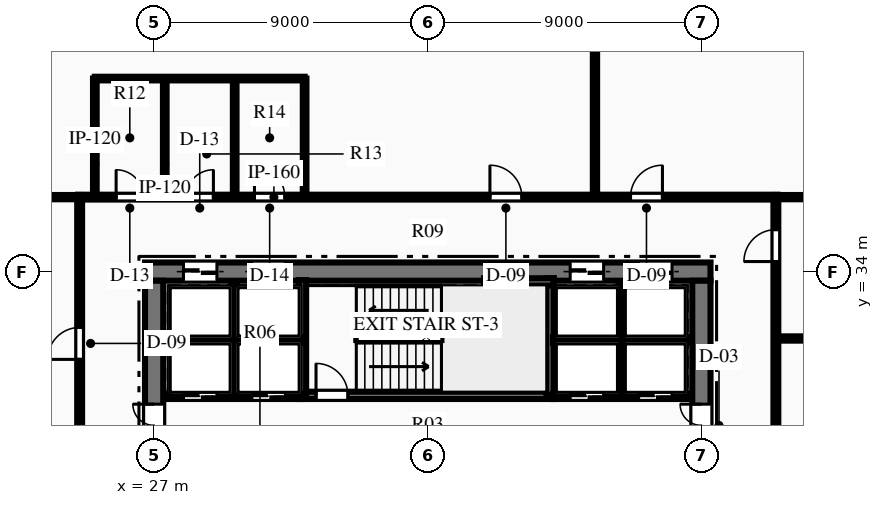
"""IFC4 building model, lengths in metres.
Left out: names, types, materials, properties, quantities, classifications, styles, units other than length and angle.
Written with IfcOpenShell. Run it as: python <this file> out.ifc"""

import sys

from ifc_helpers import new_model, si_unit, direction, frame, frame_2d, origin, place, context, subcontext, project, spatial, rectangle, extrude, element, fill, save


model = new_model("IFC4")
c1 = context("Model", 3, precision=1e-05, world=origin(), true_north=direction((0.0, 1.0)))
c2 = subcontext(c1, "Body", "Model", "MODEL_VIEW")
j1 = project(units=[si_unit("LENGTHUNIT", "METRE"), si_unit("PLANEANGLEUNIT", "RADIAN")], contexts=[c1])
p1 = place(None, origin())
s1 = spatial("IfcSite", under=j1, at=p1, CompositionType="ELEMENT")
p2 = place(p1, origin())
s2 = spatial("IfcBuilding", under=s1, at=p2, CompositionType="ELEMENT")
p3 = place(p2, frame((0.0, 0.0, 47.7)))
s3 = spatial("IfcBuildingStorey", under=s2, at=p3, CompositionType="ELEMENT", Elevation=47.7)
p4 = place(p3, frame((26.7, 34.0, 0.0), z_axis=(0.0, 0.0, 1.0), x_axis=(1.0, 0.0, 0.0)))
e1 = element("IfcWall", 1, at=p4, inside=s3, PredefinedType="SHEAR", context=c2, shape_type="SweptSolid", body=[
    extrude(rectangle(XDim=18.6, YDim=0.6, at=frame_2d((9.3, 0.0))), origin(), (0.0, 0.0, 1.0), 3.75),
])
p5 = place(p4, frame((1.265, 0.0, 0.0)))
e2 = element("IfcOpeningElement", 2, at=p5, cuts=e1, PredefinedType="OPENING", context=c2, shape_type="SweptSolid", body=[
    extrude(rectangle(XDim=1.1, YDim=2.15, at=frame_2d((0.55, 1.075))), frame((0.0, 0.31, 0.0), z_axis=(0.0, -1.0, 0.0), x_axis=(1.0, 0.0, 0.0)), (0.0, 0.0, 1.0), 0.62),
])
p6 = place(p4, frame((3.515, 0.0, 0.0)))
e3 = element("IfcOpeningElement", 3, at=p6, cuts=e1, PredefinedType="OPENING", context=c2, shape_type="SweptSolid", body=[
    extrude(rectangle(XDim=1.1, YDim=2.15, at=frame_2d((0.55, 1.075))), frame((0.0, 0.31, 0.0), z_axis=(0.0, -1.0, 0.0), x_axis=(1.0, 0.0, 0.0)), (0.0, 0.0, 1.0), 0.62),
])
p7 = place(p4, frame((13.985, 0.0, 0.0)))
e4 = element("IfcOpeningElement", 4, at=p7, cuts=e1, PredefinedType="OPENING", context=c2, shape_type="SweptSolid", body=[
    extrude(rectangle(XDim=1.1, YDim=2.15, at=frame_2d((0.55, 1.075))), frame((0.0, 0.31, 0.0), z_axis=(0.0, -1.0, 0.0), x_axis=(1.0, 0.0, 0.0)), (0.0, 0.0, 1.0), 0.62),
])
p8 = place(p4, frame((16.235, 0.0, 0.0)))
e5 = element("IfcOpeningElement", 5, at=p8, cuts=e1, PredefinedType="OPENING", context=c2, shape_type="SweptSolid", body=[
    extrude(rectangle(XDim=1.1, YDim=2.15, at=frame_2d((0.55, 1.075))), frame((0.0, 0.31, 0.0), z_axis=(0.0, -1.0, 0.0), x_axis=(1.0, 0.0, 0.0)), (0.0, 0.0, 1.0), 0.62),
])
p9 = place(p3, frame((27.0, 18.3, 0.0), z_axis=(0.0, 0.0, 1.0), x_axis=(0.0, 1.0, 0.0)))
e6 = element("IfcWall", 6, at=p9, inside=s3, PredefinedType="SHEAR", context=c2, shape_type="SweptSolid", body=[
    extrude(rectangle(XDim=15.4, YDim=0.6, at=frame_2d((7.7, 0.0))), origin(), (0.0, 0.0, 1.0), 3.75),
])
p10 = place(p9, frame((9.94, 0.0, 0.0)))
e7 = element("IfcOpeningElement", 7, at=p10, cuts=e6, PredefinedType="OPENING", context=c2, shape_type="SweptSolid", body=[
    extrude(rectangle(XDim=1.4, YDim=2.2, at=frame_2d((0.7, 1.1))), frame((0.0, 0.31, 0.0), z_axis=(0.0, -1.0, 0.0), x_axis=(1.0, 0.0, 0.0)), (0.0, 0.0, 1.0), 0.62),
])
p11 = place(p3, frame((45.0, 18.3, 0.0), z_axis=(0.0, 0.0, 1.0), x_axis=(0.0, 1.0, 0.0)))
e8 = element("IfcWall", 8, at=p11, inside=s3, PredefinedType="SHEAR", context=c2, shape_type="SweptSolid", body=[
    extrude(rectangle(XDim=15.4, YDim=0.6, at=frame_2d((7.7, 0.0))), origin(), (0.0, 0.0, 1.0), 3.75),
])
p12 = place(p11, frame((9.94, 0.0, 0.0)))
e9 = element("IfcOpeningElement", 9, at=p12, cuts=e8, PredefinedType="OPENING", context=c2, shape_type="SweptSolid", body=[
    extrude(rectangle(XDim=1.4, YDim=2.2, at=frame_2d((0.7, 1.1))), frame((0.0, 0.31, 0.0), z_axis=(0.0, -1.0, 0.0), x_axis=(1.0, 0.0, 0.0)), (0.0, 0.0, 1.0), 0.62),
])
p13 = place(p3, frame((31.76, 29.93, 0.0), z_axis=(0.0, 0.0, 1.0), x_axis=(1.0, 0.0, 0.0)))
e10 = element("IfcWall", 10, at=p13, inside=s3, PredefinedType="SHEAR", context=c2, shape_type="SweptSolid", body=[
    extrude(rectangle(XDim=8.38, YDim=0.24, at=frame_2d((4.19, 0.0))), origin(), (0.0, 0.0, 1.0), 3.75),
])
p14 = place(p13, frame((0.565, 0.0, 0.0)))
e11 = element("IfcOpeningElement", 11, at=p14, cuts=e10, PredefinedType="OPENING", context=c2, shape_type="SweptSolid", body=[
    extrude(rectangle(XDim=1.05, YDim=2.15, at=frame_2d((0.525, 1.075))), frame((0.0, 0.13, 0.0), z_axis=(0.0, -1.0, 0.0), x_axis=(1.0, 0.0, 0.0)), (0.0, 0.0, 1.0), 0.26),
])
p15 = place(p3, frame((31.88, 29.93, 0.0), z_axis=(0.0, 0.0, 1.0), x_axis=(0.0, 1.0, 0.0)))
e12 = element("IfcWall", 12, at=p15, inside=s3, PredefinedType="SHEAR", context=c2, shape_type="SweptSolid", body=[
    extrude(rectangle(XDim=3.79, YDim=0.24, at=frame_2d((1.895, 0.0))), origin(), (0.0, 0.0, 1.0), 3.75),
])
p16 = place(p3, frame((40.02, 29.93, 0.0), z_axis=(0.0, 0.0, 1.0), x_axis=(0.0, 1.0, 0.0)))
e13 = element("IfcWall", 13, at=p16, inside=s3, PredefinedType="SHEAR", context=c2, shape_type="SweptSolid", body=[
    extrude(rectangle(XDim=3.85, YDim=0.24, at=frame_2d((1.925, 0.0))), origin(), (0.0, 0.0, 1.0), 3.75),
])
p17 = place(p3, frame((37.85, 33.66, 0.0), z_axis=(0.0, 0.0, 1.0), x_axis=(1.0, 0.0, 0.0)))
e14 = element("IfcWall", 14, at=p17, inside=s3, PredefinedType="SHEAR", context=c2, shape_type="SweptSolid", body=[
    extrude(rectangle(XDim=2.29, YDim=0.24, at=frame_2d((1.145, 0.0))), origin(), (0.0, 0.0, 1.0), 3.75),
])
p18 = place(p3, frame((27.45, 29.9, 0.0), z_axis=(0.0, 0.0, 1.0), x_axis=(1.0, 0.0, 0.0)))
e15 = element("IfcWall", 15, at=p18, inside=s3, PredefinedType="PARTITIONING", context=c2, shape_type="SweptSolid", body=[
    extrude(rectangle(XDim=4.43, YDim=0.18, at=frame_2d((2.215, 0.0))), origin(), (0.0, 0.0, 1.0), 3.44),
])
p19 = place(p18, frame((0.515, 0.0, 0.0)))
e16 = element("IfcOpeningElement", 16, at=p19, cuts=e15, PredefinedType="OPENING", context=c2, shape_type="SweptSolid", body=[
    extrude(rectangle(XDim=1.1, YDim=2.15, at=frame_2d((0.55, 1.075))), frame((0.0, 0.1, 0.0), z_axis=(0.0, -1.0, 0.0), x_axis=(1.0, 0.0, 0.0)), (0.0, 0.0, 1.0), 0.2),
])
p20 = place(p18, frame((2.765, 0.0, 0.0)))
e17 = element("IfcOpeningElement", 17, at=p20, cuts=e15, PredefinedType="OPENING", context=c2, shape_type="SweptSolid", body=[
    extrude(rectangle(XDim=1.1, YDim=2.15, at=frame_2d((0.55, 1.075))), frame((0.0, 0.1, 0.0), z_axis=(0.0, -1.0, 0.0), x_axis=(1.0, 0.0, 0.0)), (0.0, 0.0, 1.0), 0.2),
])
p21 = place(p3, frame((27.45, 31.75, 0.0), z_axis=(0.0, 0.0, 1.0), x_axis=(1.0, 0.0, 0.0)))
e18 = element("IfcWall", 18, at=p21, inside=s3, PredefinedType="PARTITIONING", context=c2, shape_type="SweptSolid", body=[
    extrude(rectangle(XDim=4.43, YDim=0.18, at=frame_2d((2.215, 0.0))), origin(), (0.0, 0.0, 1.0), 3.44),
])
p22 = place(p3, frame((29.63, 29.9, 0.0), z_axis=(0.0, 0.0, 1.0), x_axis=(0.0, 1.0, 0.0)))
e19 = element("IfcWall", 19, at=p22, inside=s3, PredefinedType="PARTITIONING", context=c2, shape_type="SweptSolid", body=[
    extrude(rectangle(XDim=3.75, YDim=0.18, at=frame_2d((1.875, 0.0))), origin(), (0.0, 0.0, 1.0), 3.44),
])
p23 = place(p3, frame((40.12, 29.9, 0.0), z_axis=(0.0, 0.0, 1.0), x_axis=(1.0, 0.0, 0.0)))
e20 = element("IfcWall", 20, at=p23, inside=s3, PredefinedType="PARTITIONING", context=c2, shape_type="SweptSolid", body=[
    extrude(rectangle(XDim=4.43, YDim=0.18, at=frame_2d((2.215, 0.0))), origin(), (0.0, 0.0, 1.0), 3.44),
])
p24 = place(p23, frame((0.565, 0.0, 0.0)))
e21 = element("IfcOpeningElement", 21, at=p24, cuts=e20, PredefinedType="OPENING", context=c2, shape_type="SweptSolid", body=[
    extrude(rectangle(XDim=1.1, YDim=2.15, at=frame_2d((0.55, 1.075))), frame((0.0, 0.1, 0.0), z_axis=(0.0, -1.0, 0.0), x_axis=(1.0, 0.0, 0.0)), (0.0, 0.0, 1.0), 0.2),
])
p25 = place(p23, frame((2.815, 0.0, 0.0)))
e22 = element("IfcOpeningElement", 22, at=p25, cuts=e20, PredefinedType="OPENING", context=c2, shape_type="SweptSolid", body=[
    extrude(rectangle(XDim=1.1, YDim=2.15, at=frame_2d((0.55, 1.075))), frame((0.0, 0.1, 0.0), z_axis=(0.0, -1.0, 0.0), x_axis=(1.0, 0.0, 0.0)), (0.0, 0.0, 1.0), 0.2),
])
p26 = place(p3, frame((40.12, 31.75, 0.0), z_axis=(0.0, 0.0, 1.0), x_axis=(1.0, 0.0, 0.0)))
e23 = element("IfcWall", 23, at=p26, inside=s3, PredefinedType="PARTITIONING", context=c2, shape_type="SweptSolid", body=[
    extrude(rectangle(XDim=4.43, YDim=0.18, at=frame_2d((2.215, 0.0))), origin(), (0.0, 0.0, 1.0), 3.44),
])
p27 = place(p3, frame((42.37, 29.9, 0.0), z_axis=(0.0, 0.0, 1.0), x_axis=(0.0, 1.0, 0.0)))
e24 = element("IfcWall", 24, at=p27, inside=s3, PredefinedType="PARTITIONING", context=c2, shape_type="SweptSolid", body=[
    extrude(rectangle(XDim=3.75, YDim=0.18, at=frame_2d((1.875, 0.0))), origin(), (0.0, 0.0, 1.0), 3.44),
])
p28 = place(p3, frame((24.5, 36.45, 0.0), z_axis=(0.0, 0.0, 1.0), x_axis=(1.0, 0.0, 0.0)))
e25 = element("IfcWall", 25, at=p28, inside=s3, PredefinedType="PARTITIONING", context=c2, shape_type="SweptSolid", body=[
    extrude(rectangle(XDim=23.0, YDim=0.16, at=frame_2d((11.5, 0.0))), origin(), (0.0, 0.0, 1.0), 3.44),
])
p29 = place(p28, frame((1.25, 0.0, 0.0)))
e26 = element("IfcOpeningElement", 26, at=p29, cuts=e25, PredefinedType="OPENING", context=c2, shape_type="SweptSolid", body=[
    extrude(rectangle(XDim=0.9, YDim=2.15, at=frame_2d((0.45, 1.075))), frame((0.0, 0.09, 0.0), z_axis=(0.0, -1.0, 0.0), x_axis=(1.0, 0.0, 0.0)), (0.0, 0.0, 1.0), 0.18),
])
p30 = place(p28, frame((3.55, 0.0, 0.0)))
e27 = element("IfcOpeningElement", 27, at=p30, cuts=e25, PredefinedType="OPENING", context=c2, shape_type="SweptSolid", body=[
    extrude(rectangle(XDim=0.9, YDim=2.15, at=frame_2d((0.45, 1.075))), frame((0.0, 0.09, 0.0), z_axis=(0.0, -1.0, 0.0), x_axis=(1.0, 0.0, 0.0)), (0.0, 0.0, 1.0), 0.18),
])
p31 = place(p28, frame((5.8, 0.0, 0.0)))
e28 = element("IfcOpeningElement", 28, at=p31, cuts=e25, PredefinedType="OPENING", context=c2, shape_type="SweptSolid", body=[
    extrude(rectangle(XDim=1.0, YDim=2.15, at=frame_2d((0.5, 1.075))), frame((0.0, 0.09, 0.0), z_axis=(0.0, -1.0, 0.0), x_axis=(1.0, 0.0, 0.0)), (0.0, 0.0, 1.0), 0.18),
])
p32 = place(p28, frame((13.545, 0.0, 0.0)))
e29 = element("IfcOpeningElement", 29, at=p32, cuts=e25, PredefinedType="OPENING", context=c2, shape_type="SweptSolid", body=[
    extrude(rectangle(XDim=1.05, YDim=2.15, at=frame_2d((0.525, 1.075))), frame((0.0, 0.09, 0.0), z_axis=(0.0, -1.0, 0.0), x_axis=(1.0, 0.0, 0.0)), (0.0, 0.0, 1.0), 0.18),
])
p33 = place(p28, frame((18.169, 0.0, 0.0)))
e30 = element("IfcOpeningElement", 30, at=p33, cuts=e25, PredefinedType="OPENING", context=c2, shape_type="SweptSolid", body=[
    extrude(rectangle(XDim=1.05, YDim=2.15, at=frame_2d((0.525, 1.075))), frame((0.0, 0.09, 0.0), z_axis=(0.0, -1.0, 0.0), x_axis=(1.0, 0.0, 0.0)), (0.0, 0.0, 1.0), 0.18),
])
p34 = place(p3, frame((24.55, 15.55, 0.0), z_axis=(0.0, 0.0, 1.0), x_axis=(0.0, 1.0, 0.0)))
e31 = element("IfcWall", 31, at=p34, inside=s3, PredefinedType="PARTITIONING", context=c2, shape_type="SweptSolid", body=[
    extrude(rectangle(XDim=20.9, YDim=0.16, at=frame_2d((10.45, 0.0))), origin(), (0.0, 0.0, 1.0), 3.44),
])
p35 = place(p34, frame((5.075, 0.0, 0.0)))
e32 = element("IfcOpeningElement", 32, at=p35, cuts=e31, PredefinedType="OPENING", context=c2, shape_type="SweptSolid", body=[
    extrude(rectangle(XDim=0.95, YDim=2.15, at=frame_2d((0.475, 1.075))), frame((0.0, 0.09, 0.0), z_axis=(0.0, -1.0, 0.0), x_axis=(1.0, 0.0, 0.0)), (0.0, 0.0, 1.0), 0.18),
])
p36 = place(p34, frame((15.563, 0.0, 0.0)))
e33 = element("IfcOpeningElement", 33, at=p36, cuts=e31, PredefinedType="OPENING", context=c2, shape_type="SweptSolid", body=[
    extrude(rectangle(XDim=1.05, YDim=2.15, at=frame_2d((0.525, 1.075))), frame((0.0, 0.09, 0.0), z_axis=(0.0, -1.0, 0.0), x_axis=(1.0, 0.0, 0.0)), (0.0, 0.0, 1.0), 0.18),
])
p37 = place(p3, frame((47.45, 15.55, 0.0), z_axis=(0.0, 0.0, 1.0), x_axis=(0.0, 1.0, 0.0)))
e34 = element("IfcWall", 34, at=p37, inside=s3, PredefinedType="PARTITIONING", context=c2, shape_type="SweptSolid", body=[
    extrude(rectangle(XDim=20.9, YDim=0.16, at=frame_2d((10.45, 0.0))), origin(), (0.0, 0.0, 1.0), 3.44),
])
p38 = place(p37, frame((3.067, 0.0, 0.0)))
e35 = element("IfcOpeningElement", 35, at=p38, cuts=e34, PredefinedType="OPENING", context=c2, shape_type="SweptSolid", body=[
    extrude(rectangle(XDim=1.05, YDim=2.15, at=frame_2d((0.525, 1.075))), frame((0.0, 0.09, 0.0), z_axis=(0.0, -1.0, 0.0), x_axis=(1.0, 0.0, 0.0)), (0.0, 0.0, 1.0), 0.18),
])
p39 = place(p37, frame((6.065, 0.0, 0.0)))
e36 = element("IfcOpeningElement", 36, at=p39, cuts=e34, PredefinedType="OPENING", context=c2, shape_type="SweptSolid", body=[
    extrude(rectangle(XDim=1.05, YDim=2.15, at=frame_2d((0.525, 1.075))), frame((0.0, 0.09, 0.0), z_axis=(0.0, -1.0, 0.0), x_axis=(1.0, 0.0, 0.0)), (0.0, 0.0, 1.0), 0.18),
])
p40 = place(p37, frame((11.661, 0.0, 0.0)))
e37 = element("IfcOpeningElement", 37, at=p40, cuts=e34, PredefinedType="OPENING", context=c2, shape_type="SweptSolid", body=[
    extrude(rectangle(XDim=1.05, YDim=2.15, at=frame_2d((0.525, 1.075))), frame((0.0, 0.09, 0.0), z_axis=(0.0, -1.0, 0.0), x_axis=(1.0, 0.0, 0.0)), (0.0, 0.0, 1.0), 0.18),
])
p41 = place(p37, frame((18.781, 0.0, 0.0)))
e38 = element("IfcOpeningElement", 38, at=p41, cuts=e34, PredefinedType="OPENING", context=c2, shape_type="SweptSolid", body=[
    extrude(rectangle(XDim=1.05, YDim=2.15, at=frame_2d((0.525, 1.075))), frame((0.0, 0.09, 0.0), z_axis=(0.0, -1.0, 0.0), x_axis=(1.0, 0.0, 0.0)), (0.0, 0.0, 1.0), 0.18),
])
for number, where, z_axis, x_axis in (
    (39, (25.05, 36.45, 0.0), (0.0, 0.0, 1.0), (0.0, 1.0, 0.0)),
    (40, (27.35, 36.45, 0.0), (0.0, 0.0, 1.0), (0.0, 1.0, 0.0)),
    (41, (29.65, 36.45, 0.0), (0.0, 0.0, 1.0), (0.0, 1.0, 0.0)),
    (42, (31.95, 36.45, 0.0), (0.0, 0.0, 1.0), (0.0, 1.0, 0.0)),
):
    element("IfcWall", number, at=place(p3, frame(where, z_axis=z_axis, x_axis=x_axis)), inside=s3, PredefinedType="PARTITIONING", context=c2, shape_type="SweptSolid", body=[
        extrude(rectangle(XDim=3.9, YDim=0.12, at=frame_2d((1.95, 0.0))), origin(), (0.0, 0.0, 1.0), 3.44),
    ])
p42 = place(p3, frame((25.05, 40.35, 0.0), z_axis=(0.0, 0.0, 1.0), x_axis=(1.0, 0.0, 0.0)))
e43 = element("IfcWall", 43, at=p42, inside=s3, PredefinedType="PARTITIONING", context=c2, shape_type="SweptSolid", body=[
    extrude(rectangle(XDim=6.9, YDim=0.12, at=frame_2d((3.45, 0.0))), origin(), (0.0, 0.0, 1.0), 3.44),
])
p43 = place(p3, frame((7.852, 36.45, 0.0), z_axis=(0.0, 0.0, 1.0), x_axis=(1.0, 0.0, 0.0)))
e44 = element("IfcWall", 44, at=p43, inside=s3, PredefinedType="PARTITIONING", context=c2, shape_type="SweptSolid", body=[
    extrude(rectangle(XDim=16.698, YDim=0.14, at=frame_2d((8.349, 0.0))), origin(), (0.0, 0.0, 1.0), 2.739),
])
p44 = place(p3, frame((47.45, 36.45, 0.0), z_axis=(0.0, 0.0, 1.0), x_axis=(1.0, 0.0, 0.0)))
e45 = element("IfcWall", 45, at=p44, inside=s3, PredefinedType="PARTITIONING", context=c2, shape_type="SweptSolid", body=[
    extrude(rectangle(XDim=14.594, YDim=0.14, at=frame_2d((7.297, 0.0))), origin(), (0.0, 0.0, 1.0), 3.44),
])
p45 = place(p3, frame((41.5, 36.45, 0.0), z_axis=(0.0, 0.0, 1.0), x_axis=(0.0, 1.0, 0.0)))
e46 = element("IfcWall", 46, at=p45, inside=s3, PredefinedType="PARTITIONING", context=c2, shape_type="SweptSolid", body=[
    extrude(rectangle(XDim=16.195, YDim=0.14, at=frame_2d((8.098, 0.0))), origin(), (0.0, 0.0, 1.0), 3.44),
])
p46 = place(p3, frame((47.45, 31.8, 0.0), z_axis=(0.0, 0.0, 1.0), x_axis=(1.0, 0.0, 0.0)))
e47 = element("IfcWall", 47, at=p46, inside=s3, PredefinedType="PARTITIONING", context=c2, shape_type="SweptSolid", body=[
    extrude(rectangle(XDim=15.062, YDim=0.14, at=frame_2d((7.531, 0.0))), origin(), (0.0, 0.0, 1.0), 3.44),
])
p47 = place(p14, origin())
e48 = element("IfcDoor", 48, at=p47, inside=s3, OperationType="SINGLE_SWING_LEFT", PredefinedType="DOOR", context=c2, shape_type="SweptSolid", body=[
    extrude(rectangle(XDim=1.05, YDim=2.15, at=frame_2d((0.525, 1.075))), frame((0.0, 0.025, 0.0), z_axis=(0.0, -1.0, 0.0), x_axis=(1.0, 0.0, 0.0)), (0.0, 0.0, 1.0), 0.05),
])
fill(e11, e48)
p48 = place(p10, origin())
e49 = element("IfcDoor", 49, at=p48, inside=s3, OperationType="DOUBLE_DOOR_SINGLE_SWING", PredefinedType="DOOR", context=c2, shape_type="SweptSolid", body=[
    extrude(rectangle(XDim=1.4, YDim=2.2, at=frame_2d((0.7, 1.1))), frame((0.0, 0.025, 0.0), z_axis=(0.0, -1.0, 0.0), x_axis=(1.0, 0.0, 0.0)), (0.0, 0.0, 1.0), 0.05),
])
fill(e7, e49)
p49 = place(p12, origin())
e50 = element("IfcDoor", 50, at=p49, inside=s3, OperationType="DOUBLE_DOOR_SINGLE_SWING", PredefinedType="DOOR", context=c2, shape_type="SweptSolid", body=[
    extrude(rectangle(XDim=1.4, YDim=2.2, at=frame_2d((0.7, 1.1))), frame((0.0, 0.025, 0.0), z_axis=(0.0, -1.0, 0.0), x_axis=(1.0, 0.0, 0.0)), (0.0, 0.0, 1.0), 0.05),
])
fill(e9, e50)
p50 = place(p29, origin())
e51 = element("IfcDoor", 51, at=p50, inside=s3, OperationType="SINGLE_SWING_LEFT", PredefinedType="DOOR", context=c2, shape_type="SweptSolid", body=[
    extrude(rectangle(XDim=0.9, YDim=2.15, at=frame_2d((0.45, 1.075))), frame((0.0, 0.025, 0.0), z_axis=(0.0, -1.0, 0.0), x_axis=(1.0, 0.0, 0.0)), (0.0, 0.0, 1.0), 0.05),
])
fill(e26, e51)
p51 = place(p30, origin())
e52 = element("IfcDoor", 52, at=p51, inside=s3, OperationType="SINGLE_SWING_RIGHT", PredefinedType="DOOR", context=c2, shape_type="SweptSolid", body=[
    extrude(rectangle(XDim=0.9, YDim=2.15, at=frame_2d((0.45, 1.075))), frame((0.0, 0.025, 0.0), z_axis=(0.0, -1.0, 0.0), x_axis=(1.0, 0.0, 0.0)), (0.0, 0.0, 1.0), 0.05),
])
fill(e27, e52)
p52 = place(p31, origin())
e53 = element("IfcDoor", 53, at=p52, inside=s3, OperationType="SINGLE_SWING_LEFT", PredefinedType="DOOR", context=c2, shape_type="SweptSolid", body=[
    extrude(rectangle(XDim=1.0, YDim=2.15, at=frame_2d((0.5, 1.075))), frame((0.0, 0.025, 0.0), z_axis=(0.0, -1.0, 0.0), x_axis=(1.0, 0.0, 0.0)), (0.0, 0.0, 1.0), 0.05),
])
fill(e28, e53)
p53 = place(p32, origin())
e54 = element("IfcDoor", 54, at=p53, inside=s3, OperationType="SINGLE_SWING_LEFT", PredefinedType="DOOR", context=c2, shape_type="SweptSolid", body=[
    extrude(rectangle(XDim=1.05, YDim=2.15, at=frame_2d((0.525, 1.075))), frame((0.0, 0.025, 0.0), z_axis=(0.0, -1.0, 0.0), x_axis=(1.0, 0.0, 0.0)), (0.0, 0.0, 1.0), 0.05),
])
fill(e29, e54)
p54 = place(p33, origin())
e55 = element("IfcDoor", 55, at=p54, inside=s3, OperationType="SINGLE_SWING_RIGHT", PredefinedType="DOOR", context=c2, shape_type="SweptSolid", body=[
    extrude(rectangle(XDim=1.05, YDim=2.15, at=frame_2d((0.525, 1.075))), frame((0.0, 0.025, 0.0), z_axis=(0.0, -1.0, 0.0), x_axis=(1.0, 0.0, 0.0)), (0.0, 0.0, 1.0), 0.05),
])
fill(e30, e55)
p55 = place(p36, origin())
e56 = element("IfcDoor", 56, at=p55, inside=s3, OperationType="SINGLE_SWING_LEFT", PredefinedType="DOOR", context=c2, shape_type="SweptSolid", body=[
    extrude(rectangle(XDim=1.05, YDim=2.15, at=frame_2d((0.525, 1.075))), frame((0.0, 0.025, 0.0), z_axis=(0.0, -1.0, 0.0), x_axis=(1.0, 0.0, 0.0)), (0.0, 0.0, 1.0), 0.05),
])
fill(e33, e56)
p56 = place(p41, origin())
e57 = element("IfcDoor", 57, at=p56, inside=s3, OperationType="SINGLE_SWING_LEFT", PredefinedType="DOOR", context=c2, shape_type="SweptSolid", body=[
    extrude(rectangle(XDim=1.05, YDim=2.15, at=frame_2d((0.525, 1.075))), frame((0.0, 0.025, 0.0), z_axis=(0.0, -1.0, 0.0), x_axis=(1.0, 0.0, 0.0)), (0.0, 0.0, 1.0), 0.05),
])
fill(e38, e57)
p57 = place(p19, origin())
e58 = element("IfcDoor", 58, at=p57, inside=s3, OperationType="SLIDING_TO_LEFT", PredefinedType="DOOR", context=c2, shape_type="SweptSolid", body=[
    extrude(rectangle(XDim=1.1, YDim=2.15, at=frame_2d((0.55, 1.075))), frame((0.0, 0.025, 0.0), z_axis=(0.0, -1.0, 0.0), x_axis=(1.0, 0.0, 0.0)), (0.0, 0.0, 1.0), 0.05),
])
fill(e16, e58)
p58 = place(p20, origin())
e59 = element("IfcDoor", 59, at=p58, inside=s3, OperationType="SLIDING_TO_LEFT", PredefinedType="DOOR", context=c2, shape_type="SweptSolid", body=[
    extrude(rectangle(XDim=1.1, YDim=2.15, at=frame_2d((0.55, 1.075))), frame((0.0, 0.025, 0.0), z_axis=(0.0, -1.0, 0.0), x_axis=(1.0, 0.0, 0.0)), (0.0, 0.0, 1.0), 0.05),
])
fill(e17, e59)
p59 = place(p5, origin())
e60 = element("IfcDoor", 60, at=p59, inside=s3, OperationType="SLIDING_TO_LEFT", PredefinedType="DOOR", context=c2, shape_type="SweptSolid", body=[
    extrude(rectangle(XDim=1.1, YDim=2.15, at=frame_2d((0.55, 1.075))), frame((0.0, 0.025, 0.0), z_axis=(0.0, -1.0, 0.0), x_axis=(1.0, 0.0, 0.0)), (0.0, 0.0, 1.0), 0.05),
])
fill(e2, e60)
p60 = place(p6, origin())
e61 = element("IfcDoor", 61, at=p60, inside=s3, OperationType="SLIDING_TO_LEFT", PredefinedType="DOOR", context=c2, shape_type="SweptSolid", body=[
    extrude(rectangle(XDim=1.1, YDim=2.15, at=frame_2d((0.55, 1.075))), frame((0.0, 0.025, 0.0), z_axis=(0.0, -1.0, 0.0), x_axis=(1.0, 0.0, 0.0)), (0.0, 0.0, 1.0), 0.05),
])
fill(e3, e61)
p61 = place(p24, origin())
e62 = element("IfcDoor", 62, at=p61, inside=s3, OperationType="SLIDING_TO_LEFT", PredefinedType="DOOR", context=c2, shape_type="SweptSolid", body=[
    extrude(rectangle(XDim=1.1, YDim=2.15, at=frame_2d((0.55, 1.075))), frame((0.0, 0.025, 0.0), z_axis=(0.0, -1.0, 0.0), x_axis=(1.0, 0.0, 0.0)), (0.0, 0.0, 1.0), 0.05),
])
fill(e21, e62)
p62 = place(p25, origin())
e63 = element("IfcDoor", 63, at=p62, inside=s3, OperationType="SLIDING_TO_LEFT", PredefinedType="DOOR", context=c2, shape_type="SweptSolid", body=[
    extrude(rectangle(XDim=1.1, YDim=2.15, at=frame_2d((0.55, 1.075))), frame((0.0, 0.025, 0.0), z_axis=(0.0, -1.0, 0.0), x_axis=(1.0, 0.0, 0.0)), (0.0, 0.0, 1.0), 0.05),
])
fill(e22, e63)
p63 = place(p7, origin())
e64 = element("IfcDoor", 64, at=p63, inside=s3, OperationType="SLIDING_TO_LEFT", PredefinedType="DOOR", context=c2, shape_type="SweptSolid", body=[
    extrude(rectangle(XDim=1.1, YDim=2.15, at=frame_2d((0.55, 1.075))), frame((0.0, 0.025, 0.0), z_axis=(0.0, -1.0, 0.0), x_axis=(1.0, 0.0, 0.0)), (0.0, 0.0, 1.0), 0.05),
])
fill(e4, e64)
p64 = place(p8, origin())
e65 = element("IfcDoor", 65, at=p64, inside=s3, OperationType="SLIDING_TO_LEFT", PredefinedType="DOOR", context=c2, shape_type="SweptSolid", body=[
    extrude(rectangle(XDim=1.1, YDim=2.15, at=frame_2d((0.55, 1.075))), frame((0.0, 0.025, 0.0), z_axis=(0.0, -1.0, 0.0), x_axis=(1.0, 0.0, 0.0)), (0.0, 0.0, 1.0), 0.05),
])
fill(e5, e65)
save(model, sys.argv[1])
